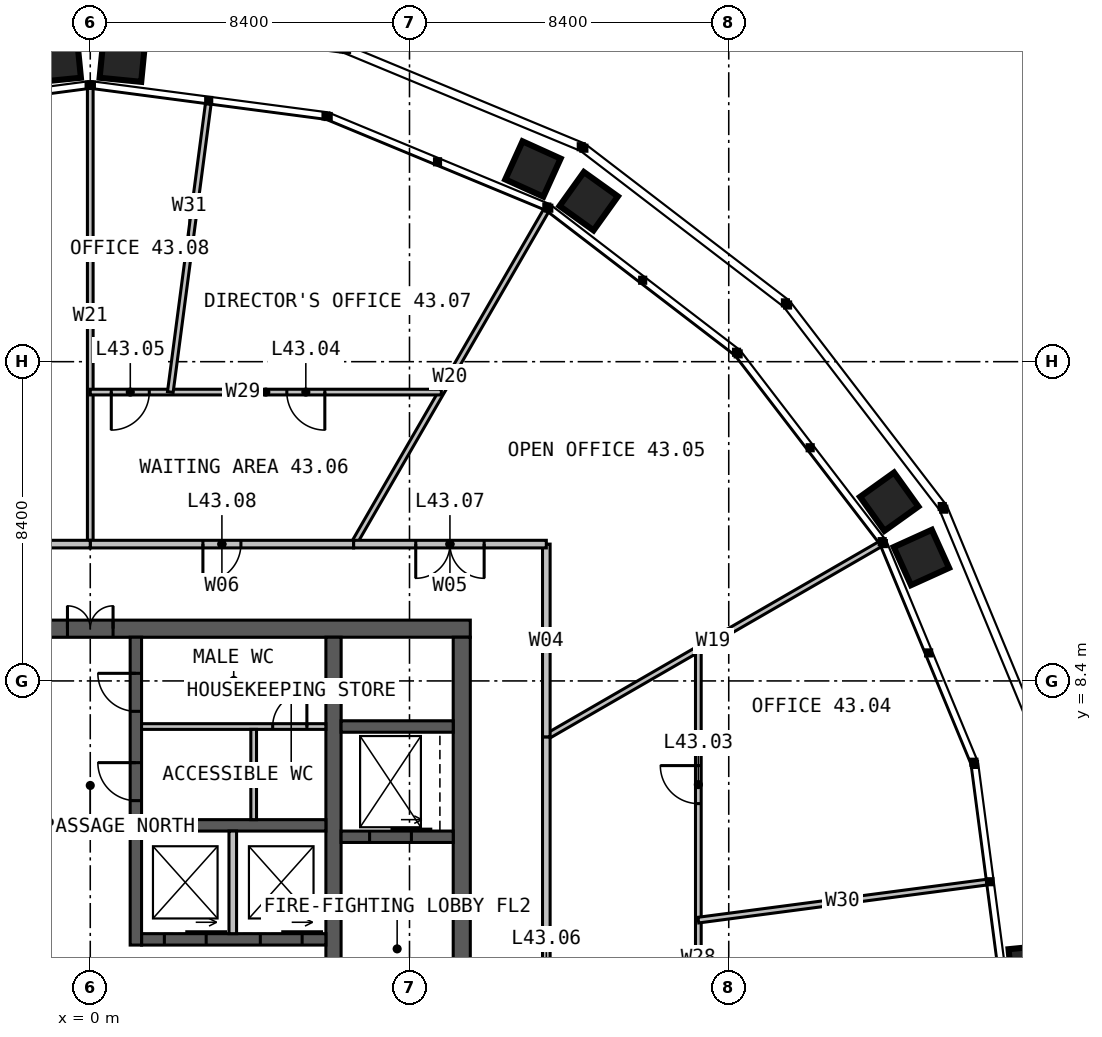
"""IFC4 building model, lengths in metres.
Left out: names, types, materials, properties, quantities, classifications, styles, units other than length and angle.
Written with IfcOpenShell. Run it as: python <this file> out.ifc"""

import sys

from ifc_helpers import new_model, si_unit, direction, frame, frame_2d, origin, place, context, subcontext, project, spatial, rectangle, extrude, element, fill, save


model = new_model("IFC4")
c1 = context("Model", 3, precision=1e-05, world=origin(), true_north=direction((0.0, 1.0)))
c2 = subcontext(c1, "Body", "Model", "MODEL_VIEW")
j1 = project(units=[si_unit("LENGTHUNIT", "METRE"), si_unit("PLANEANGLEUNIT", "RADIAN")], contexts=[c1])
p1 = place(None, origin())
s1 = spatial("IfcSite", under=j1, at=p1, CompositionType="ELEMENT")
p2 = place(p1, origin())
s2 = spatial("IfcBuilding", under=s1, at=p2, CompositionType="ELEMENT")
p3 = place(p2, frame((0.0, 0.0, 179.0)))
s3 = spatial("IfcBuildingStorey", under=s2, at=p3, CompositionType="ELEMENT", Elevation=179.0)
p4 = place(p3, frame((-10.0, 9.775, 0.0), z_axis=(0.0, 0.0, 1.0), x_axis=(1.0, 0.0, 0.0)))
e1 = element("IfcWall", 1, at=p4, inside=s3, PredefinedType="SOLIDWALL", context=c2, shape_type="SweptSolid", body=[
    extrude(rectangle(XDim=20.0, YDim=0.45, at=frame_2d((10.0, 0.0))), origin(), (0.0, 0.0, 1.0), 4.0),
])
p5 = place(p4, frame((9.4, 0.0, 0.0)))
e2 = element("IfcOpeningElement", 2, at=p5, cuts=e1, PredefinedType="OPENING", context=c2, shape_type="SweptSolid", body=[
    extrude(rectangle(XDim=1.2, YDim=2.2, at=frame_2d((0.6, 1.1))), frame((0.0, 0.235, 0.0), z_axis=(0.0, -1.0, 0.0), x_axis=(1.0, 0.0, 0.0)), (0.0, 0.0, 1.0), 0.47),
])
p6 = place(p3, frame((9.775, -9.55, 0.0), z_axis=(0.0, 0.0, 1.0), x_axis=(0.0, 1.0, 0.0)))
e3 = element("IfcWall", 3, at=p6, inside=s3, PredefinedType="SOLIDWALL", context=c2, shape_type="SweptSolid", body=[
    extrude(rectangle(XDim=19.1, YDim=0.45, at=frame_2d((9.55, 0.0))), origin(), (0.0, 0.0, 1.0), 4.0),
])
p7 = place(p3, frame((6.4, 9.55, 0.0), z_axis=(0.0, 0.0, 1.0), x_axis=(0.0, -1.0, 0.0)))
e4 = element("IfcWall", 4, at=p7, inside=s3, PredefinedType="SOLIDWALL", context=c2, shape_type="SweptSolid", body=[
    extrude(rectangle(XDim=19.1, YDim=0.4, at=frame_2d((9.55, 0.0))), origin(), (0.0, 0.0, 1.0), 4.0),
])
p8 = place(p7, frame((9.05, 0.0, 0.0)))
e5 = element("IfcOpeningElement", 5, at=p8, cuts=e4, PredefinedType="OPENING", context=c2, shape_type="SweptSolid", body=[
    extrude(rectangle(XDim=1.0, YDim=2.2, at=frame_2d((0.5, 1.1))), frame((0.0, 0.21, 0.0), z_axis=(0.0, -1.0, 0.0), x_axis=(1.0, 0.0, 0.0)), (0.0, 0.0, 1.0), 0.42),
])
p9 = place(p3, frame((1.35, 1.6, 0.0), z_axis=(0.0, 0.0, 1.0), x_axis=(1.0, 0.0, 0.0)))
e6 = element("IfcWall", 6, at=p9, inside=s3, PredefinedType="SOLIDWALL", context=c2, shape_type="SweptSolid", body=[
    extrude(rectangle(XDim=4.85, YDim=0.3, at=frame_2d((2.425, 0.0))), origin(), (0.0, 0.0, 1.0), 4.0),
])
p10 = place(p9, frame((0.6, 0.0, 0.0)))
e7 = element("IfcOpeningElement", 7, at=p10, cuts=e6, PredefinedType="OPENING", context=c2, shape_type="SweptSolid", body=[
    extrude(rectangle(XDim=1.1, YDim=2.2, at=frame_2d((0.55, 1.1))), frame((0.0, 0.16, 0.0), z_axis=(0.0, -1.0, 0.0), x_axis=(1.0, 0.0, 0.0)), (0.0, 0.0, 1.0), 0.32),
])
p11 = place(p9, frame((3.125, 0.0, 0.0)))
e8 = element("IfcOpeningElement", 8, at=p11, cuts=e6, PredefinedType="OPENING", context=c2, shape_type="SweptSolid", body=[
    extrude(rectangle(XDim=1.1, YDim=2.2, at=frame_2d((0.55, 1.1))), frame((0.0, 0.16, 0.0), z_axis=(0.0, -1.0, 0.0), x_axis=(1.0, 0.0, 0.0)), (0.0, 0.0, 1.0), 0.32),
])
p12 = place(p3, frame((1.35, 4.6, 0.0), z_axis=(0.0, 0.0, 1.0), x_axis=(1.0, 0.0, 0.0)))
e9 = element("IfcWall", 9, at=p12, inside=s3, PredefinedType="SOLIDWALL", context=c2, shape_type="SweptSolid", body=[
    extrude(rectangle(XDim=4.85, YDim=0.3, at=frame_2d((2.425, 0.0))), origin(), (0.0, 0.0, 1.0), 4.0),
])
p13 = place(p3, frame((1.2, 1.45, 0.0), z_axis=(0.0, 0.0, 1.0), x_axis=(0.0, 1.0, 0.0)))
e10 = element("IfcWall", 10, at=p13, inside=s3, PredefinedType="SOLIDWALL", context=c2, shape_type="SweptSolid", body=[
    extrude(rectangle(XDim=8.1, YDim=0.3, at=frame_2d((4.05, 0.0))), origin(), (0.0, 0.0, 1.0), 4.0),
])
p14 = place(p13, frame((3.8, 0.0, 0.0)))
e11 = element("IfcOpeningElement", 11, at=p14, cuts=e10, PredefinedType="OPENING", context=c2, shape_type="SweptSolid", body=[
    extrude(rectangle(XDim=1.0, YDim=2.2, at=frame_2d((0.5, 1.1))), frame((0.0, 0.16, 0.0), z_axis=(0.0, -1.0, 0.0), x_axis=(1.0, 0.0, 0.0)), (0.0, 0.0, 1.0), 0.32),
])
p15 = place(p13, frame((6.15, 0.0, 0.0)))
e12 = element("IfcOpeningElement", 12, at=p15, cuts=e10, PredefinedType="OPENING", context=c2, shape_type="SweptSolid", body=[
    extrude(rectangle(XDim=1.0, YDim=2.2, at=frame_2d((0.5, 1.1))), frame((0.0, 0.16, 0.0), z_axis=(0.0, -1.0, 0.0), x_axis=(1.0, 0.0, 0.0)), (0.0, 0.0, 1.0), 0.32),
])
p16 = place(p3, frame((6.6, 4.3, 0.0), z_axis=(0.0, 0.0, 1.0), x_axis=(1.0, 0.0, 0.0)))
e13 = element("IfcWall", 13, at=p16, inside=s3, PredefinedType="SOLIDWALL", context=c2, shape_type="SweptSolid", body=[
    extrude(rectangle(XDim=2.95, YDim=0.3, at=frame_2d((1.475, 0.0))), origin(), (0.0, 0.0, 1.0), 4.0),
])
p17 = place(p16, frame((0.75, 0.0, 0.0)))
e14 = element("IfcOpeningElement", 14, at=p17, cuts=e13, PredefinedType="OPENING", context=c2, shape_type="SweptSolid", body=[
    extrude(rectangle(XDim=1.1, YDim=2.2, at=frame_2d((0.55, 1.1))), frame((0.0, 0.16, 0.0), z_axis=(0.0, -1.0, 0.0), x_axis=(1.0, 0.0, 0.0)), (0.0, 0.0, 1.0), 0.32),
])
p18 = place(p3, frame((6.6, 7.2, 0.0), z_axis=(0.0, 0.0, 1.0), x_axis=(1.0, 0.0, 0.0)))
e15 = element("IfcWall", 15, at=p18, inside=s3, PredefinedType="SOLIDWALL", context=c2, shape_type="SweptSolid", body=[
    extrude(rectangle(XDim=2.95, YDim=0.3, at=frame_2d((1.475, 0.0))), origin(), (0.0, 0.0, 1.0), 4.0),
])
p19 = place(p3, frame((3.75, 1.75, 0.0), z_axis=(0.0, 0.0, 1.0), x_axis=(0.0, 1.0, 0.0)))
e16 = element("IfcWall", 16, at=p19, inside=s3, PredefinedType="SOLIDWALL", context=c2, shape_type="SweptSolid", body=[
    extrude(rectangle(XDim=2.7, YDim=0.2, at=frame_2d((1.35, 0.0))), origin(), (0.0, 0.0, 1.0), 3.75),
])
p20 = place(p3, frame((1.35, 7.2, 0.0), z_axis=(0.0, 0.0, 1.0), x_axis=(1.0, 0.0, 0.0)))
e17 = element("IfcWall", 17, at=p20, inside=s3, PredefinedType="PARTITIONING", context=c2, shape_type="SweptSolid", body=[
    extrude(rectangle(XDim=4.85, YDim=0.15, at=frame_2d((2.425, 0.0))), origin(), (0.0, 0.0, 1.0), 3.75),
])
p21 = place(p20, frame((3.45, 0.0, 0.0)))
e18 = element("IfcOpeningElement", 18, at=p21, cuts=e17, PredefinedType="OPENING", context=c2, shape_type="SweptSolid", body=[
    extrude(rectangle(XDim=0.9, YDim=2.2, at=frame_2d((0.45, 1.1))), frame((0.0, 0.085, 0.0), z_axis=(0.0, -1.0, 0.0), x_axis=(1.0, 0.0, 0.0)), (0.0, 0.0, 1.0), 0.17),
])
p22 = place(p3, frame((4.3, 4.75, 0.0), z_axis=(0.0, 0.0, 1.0), x_axis=(0.0, 1.0, 0.0)))
e19 = element("IfcWall", 19, at=p22, inside=s3, PredefinedType="PARTITIONING", context=c2, shape_type="SweptSolid", body=[
    extrude(rectangle(XDim=2.375, YDim=0.15, at=frame_2d((1.188, 0.0))), origin(), (0.0, 0.0, 1.0), 3.75),
])
for number, where, z_axis, x_axis in (
    (20, (12.0, 6.928, 0.0), (0.0, 0.0, 1.0), (0.866, 0.5, 0.0)),
    (21, (6.928, 12.0, 0.0), (0.0, 0.0, 1.0), (0.5, 0.866, 0.0)),
):
    element("IfcWall", number, at=place(p3, frame(where, z_axis=z_axis, x_axis=x_axis)), inside=s3, PredefinedType="PARTITIONING", context=c2, shape_type="SweptSolid", body=[
        extrude(rectangle(XDim=10.136, YDim=0.15, at=frame_2d((5.068, 0.0))), origin(), (0.0, 0.0, 1.0), 2.79),
    ])
p23 = place(p3, frame((0.0, 12.0, 0.0), z_axis=(0.0, 0.0, 1.0), x_axis=(0.0, 1.0, 0.0)))
e22 = element("IfcWall", 22, at=p23, inside=s3, PredefinedType="PARTITIONING", context=c2, shape_type="SweptSolid", body=[
    extrude(rectangle(XDim=11.992, YDim=0.15, at=frame_2d((5.996, 0.0))), origin(), (0.0, 0.0, 1.0), 2.79),
])
p24 = place(p3, frame((16.0, -9.238, 0.0), z_axis=(0.0, 0.0, 1.0), x_axis=(0.0, 1.0, 0.0)))
e23 = element("IfcWall", 23, at=p24, inside=s3, PredefinedType="PARTITIONING", context=c2, shape_type="SweptSolid", body=[
    extrude(rectangle(XDim=18.475, YDim=0.15, at=frame_2d((9.238, 0.0))), origin(), (0.0, 0.0, 1.0), 2.79),
])
p25 = place(p24, frame((1.975, 0.0, 0.0)))
e24 = element("IfcOpeningElement", 24, at=p25, cuts=e23, PredefinedType="OPENING", context=c2, shape_type="SweptSolid", body=[
    extrude(rectangle(XDim=1.0, YDim=2.2, at=frame_2d((0.5, 1.1))), frame((0.0, 0.085, 0.0), z_axis=(0.0, -1.0, 0.0), x_axis=(1.0, 0.0, 0.0)), (0.0, 0.0, 1.0), 0.17),
])
p26 = place(p24, frame((7.647, 0.0, 0.0)))
e25 = element("IfcOpeningElement", 25, at=p26, cuts=e23, PredefinedType="OPENING", context=c2, shape_type="SweptSolid", body=[
    extrude(rectangle(XDim=1.0, YDim=2.2, at=frame_2d((0.5, 1.1))), frame((0.0, 0.085, 0.0), z_axis=(0.0, -1.0, 0.0), x_axis=(1.0, 0.0, 0.0)), (0.0, 0.0, 1.0), 0.17),
])
p27 = place(p24, frame((14.41, 0.0, 0.0)))
e26 = element("IfcOpeningElement", 26, at=p27, cuts=e23, PredefinedType="OPENING", context=c2, shape_type="SweptSolid", body=[
    extrude(rectangle(XDim=1.0, YDim=2.2, at=frame_2d((0.5, 1.1))), frame((0.0, 0.085, 0.0), z_axis=(0.0, -1.0, 0.0), x_axis=(1.0, 0.0, 0.0)), (0.0, 0.0, 1.0), 0.17),
])
p28 = place(p3, frame((16.0, 2.106, 0.0), z_axis=(0.0, 0.0, 1.0), x_axis=(0.991446471711, 0.130513959913, 0.0)))
e27 = element("IfcWall", 27, at=p28, inside=s3, PredefinedType="PARTITIONING", context=c2, shape_type="SweptSolid", body=[
    extrude(rectangle(XDim=7.649, YDim=0.15, at=frame_2d((3.824, 0.0))), origin(), (0.0, 0.0, 1.0), 2.79),
])
p29 = place(p3, frame((12.0, -6.928, 0.0), z_axis=(0.0, 0.0, 1.0), x_axis=(0.0, 1.0, 0.0)))
e28 = element("IfcWall", 28, at=p29, inside=s3, PredefinedType="PARTITIONING", context=c2, shape_type="SweptSolid", body=[
    extrude(rectangle(XDim=13.856, YDim=0.2, at=frame_2d((6.928, 0.0))), origin(), (0.0, 0.0, 1.0), 3.8),
])
p30 = place(p29, frame((6.028, 0.0, 0.0)))
e29 = element("IfcOpeningElement", 29, at=p30, cuts=e28, PredefinedType="OPENING", context=c2, shape_type="SweptSolid", body=[
    extrude(rectangle(XDim=1.8, YDim=2.2, at=frame_2d((0.9, 1.1))), frame((0.0, 0.11, 0.0), z_axis=(0.0, -1.0, 0.0), x_axis=(1.0, 0.0, 0.0)), (0.0, 0.0, 1.0), 0.22),
])
p31 = place(p3, frame((12.0, 6.928, 0.0), z_axis=(0.0, 0.0, 1.0), x_axis=(0.0, 1.0, 0.0)))
e30 = element("IfcWall", 30, at=p31, inside=s3, PredefinedType="PARTITIONING", context=c2, shape_type="SweptSolid", body=[
    extrude(rectangle(XDim=5.072, YDim=0.2, at=frame_2d((2.536, 0.0))), origin(), (0.0, 0.0, 1.0), 3.8),
])
p32 = place(p3, frame((12.0, 12.0, 0.0), z_axis=(0.0, 0.0, 1.0), x_axis=(-1.0, 0.0, 0.0)))
e31 = element("IfcWall", 31, at=p32, inside=s3, PredefinedType="PARTITIONING", context=c2, shape_type="SweptSolid", body=[
    extrude(rectangle(XDim=5.072, YDim=0.2, at=frame_2d((2.536, 0.0))), origin(), (0.0, 0.0, 1.0), 3.8),
])
p33 = place(p32, frame((1.636, 0.0, 0.0)))
e32 = element("IfcOpeningElement", 32, at=p33, cuts=e31, PredefinedType="OPENING", context=c2, shape_type="SweptSolid", body=[
    extrude(rectangle(XDim=1.8, YDim=2.2, at=frame_2d((0.9, 1.1))), frame((0.0, 0.11, 0.0), z_axis=(0.0, -1.0, 0.0), x_axis=(1.0, 0.0, 0.0)), (0.0, 0.0, 1.0), 0.22),
])
p34 = place(p3, frame((9.238, 16.0, 0.0), z_axis=(0.0, 0.0, 1.0), x_axis=(-1.0, 0.0, 0.0)))
e33 = element("IfcWall", 33, at=p34, inside=s3, PredefinedType="PARTITIONING", context=c2, shape_type="SweptSolid", body=[
    extrude(rectangle(XDim=9.238, YDim=0.15, at=frame_2d((4.619, 0.0))), origin(), (0.0, 0.0, 1.0), 2.79),
])
p35 = place(p34, frame((3.066, 0.0, 0.0)))
e34 = element("IfcOpeningElement", 34, at=p35, cuts=e33, PredefinedType="OPENING", context=c2, shape_type="SweptSolid", body=[
    extrude(rectangle(XDim=1.0, YDim=2.2, at=frame_2d((0.5, 1.1))), frame((0.0, 0.085, 0.0), z_axis=(0.0, -1.0, 0.0), x_axis=(1.0, 0.0, 0.0)), (0.0, 0.0, 1.0), 0.17),
])
p36 = place(p34, frame((7.684, 0.0, 0.0)))
e35 = element("IfcOpeningElement", 35, at=p36, cuts=e33, PredefinedType="OPENING", context=c2, shape_type="SweptSolid", body=[
    extrude(rectangle(XDim=1.0, YDim=2.2, at=frame_2d((0.5, 1.1))), frame((0.0, 0.085, 0.0), z_axis=(0.0, -1.0, 0.0), x_axis=(1.0, 0.0, 0.0)), (0.0, 0.0, 1.0), 0.17),
])
p37 = place(p3, frame((2.106, 16.0, 0.0), z_axis=(0.0, 0.0, 1.0), x_axis=(0.130513959913, 0.991446471711, 0.0)))
e36 = element("IfcWall", 36, at=p37, inside=s3, PredefinedType="PARTITIONING", context=c2, shape_type="SweptSolid", body=[
    extrude(rectangle(XDim=7.649, YDim=0.15, at=frame_2d((3.824, 0.0))), origin(), (0.0, 0.0, 1.0), 2.79),
])
p38 = place(p3, frame((6.928, 12.0, 0.0), z_axis=(0.0, 0.0, 1.0), x_axis=(-1.0, 0.0, 0.0)))
e37 = element("IfcWall", 37, at=p38, inside=s3, PredefinedType="PARTITIONING", context=c2, shape_type="SweptSolid", body=[
    extrude(rectangle(XDim=6.928, YDim=0.2, at=frame_2d((3.464, 0.0))), origin(), (0.0, 0.0, 1.0), 3.8),
])
p39 = place(p38, frame((2.964, 0.0, 0.0)))
e38 = element("IfcOpeningElement", 38, at=p39, cuts=e37, PredefinedType="OPENING", context=c2, shape_type="SweptSolid", body=[
    extrude(rectangle(XDim=1.0, YDim=2.2, at=frame_2d((0.5, 1.1))), frame((0.0, 0.11, 0.0), z_axis=(0.0, -1.0, 0.0), x_axis=(1.0, 0.0, 0.0)), (0.0, 0.0, 1.0), 0.22),
])
p40 = place(p3, frame((0.0, 12.0, 0.0), z_axis=(0.0, 0.0, 1.0), x_axis=(-1.0, 0.0, 0.0)))
e39 = element("IfcWall", 39, at=p40, inside=s3, PredefinedType="PARTITIONING", context=c2, shape_type="SweptSolid", body=[
    extrude(rectangle(XDim=6.928, YDim=0.2, at=frame_2d((3.464, 0.0))), origin(), (0.0, 0.0, 1.0), 3.8),
])
p41 = place(p40, frame((2.964, 0.0, 0.0)))
e40 = element("IfcOpeningElement", 40, at=p41, cuts=e39, PredefinedType="OPENING", context=c2, shape_type="SweptSolid", body=[
    extrude(rectangle(XDim=1.0, YDim=2.2, at=frame_2d((0.5, 1.1))), frame((0.0, 0.11, 0.0), z_axis=(0.0, -1.0, 0.0), x_axis=(1.0, 0.0, 0.0)), (0.0, 0.0, 1.0), 0.22),
])
p42 = place(p5, origin())
e41 = element("IfcDoor", 41, at=p42, inside=s3, OperationType="DOUBLE_DOOR_SINGLE_SWING", PredefinedType="DOOR", context=c2, shape_type="SweptSolid", body=[
    extrude(rectangle(XDim=1.2, YDim=2.2, at=frame_2d((0.6, 1.1))), frame((0.0, 0.025, 0.0), z_axis=(0.0, -1.0, 0.0), x_axis=(1.0, 0.0, 0.0)), (0.0, 0.0, 1.0), 0.05),
])
fill(e2, e41)
p43 = place(p14, origin())
e42 = element("IfcDoor", 42, at=p43, inside=s3, OperationType="SINGLE_SWING_RIGHT", PredefinedType="DOOR", context=c2, shape_type="SweptSolid", body=[
    extrude(rectangle(XDim=1.0, YDim=2.2, at=frame_2d((0.5, 1.1))), frame((0.0, 0.025, 0.0), z_axis=(0.0, -1.0, 0.0), x_axis=(1.0, 0.0, 0.0)), (0.0, 0.0, 1.0), 0.05),
])
fill(e11, e42)
p44 = place(p15, origin())
e43 = element("IfcDoor", 43, at=p44, inside=s3, OperationType="SINGLE_SWING_RIGHT", PredefinedType="DOOR", context=c2, shape_type="SweptSolid", body=[
    extrude(rectangle(XDim=1.0, YDim=2.2, at=frame_2d((0.5, 1.1))), frame((0.0, 0.025, 0.0), z_axis=(0.0, -1.0, 0.0), x_axis=(1.0, 0.0, 0.0)), (0.0, 0.0, 1.0), 0.05),
])
fill(e12, e43)
p45 = place(p21, origin())
e44 = element("IfcDoor", 44, at=p45, inside=s3, OperationType="SINGLE_SWING_RIGHT", PredefinedType="DOOR", context=c2, shape_type="SweptSolid", body=[
    extrude(rectangle(XDim=0.9, YDim=2.2, at=frame_2d((0.45, 1.1))), frame((0.0, 0.025, 0.0), z_axis=(0.0, -1.0, 0.0), x_axis=(1.0, 0.0, 0.0)), (0.0, 0.0, 1.0), 0.05),
])
fill(e18, e44)
p46 = place(p10, origin())
e45 = element("IfcDoor", 45, at=p46, inside=s3, OperationType="SLIDING_TO_LEFT", PredefinedType="DOOR", context=c2, shape_type="SweptSolid", body=[
    extrude(rectangle(XDim=1.1, YDim=2.2, at=frame_2d((0.55, 1.1))), frame((0.0, 0.025, 0.0), z_axis=(0.0, -1.0, 0.0), x_axis=(1.0, 0.0, 0.0)), (0.0, 0.0, 1.0), 0.05),
])
fill(e7, e45)
p47 = place(p11, origin())
e46 = element("IfcDoor", 46, at=p47, inside=s3, OperationType="SLIDING_TO_LEFT", PredefinedType="DOOR", context=c2, shape_type="SweptSolid", body=[
    extrude(rectangle(XDim=1.1, YDim=2.2, at=frame_2d((0.55, 1.1))), frame((0.0, 0.025, 0.0), z_axis=(0.0, -1.0, 0.0), x_axis=(1.0, 0.0, 0.0)), (0.0, 0.0, 1.0), 0.05),
])
fill(e8, e46)
p48 = place(p17, origin())
e47 = element("IfcDoor", 47, at=p48, inside=s3, OperationType="SLIDING_TO_LEFT", PredefinedType="DOOR", context=c2, shape_type="SweptSolid", body=[
    extrude(rectangle(XDim=1.1, YDim=2.2, at=frame_2d((0.55, 1.1))), frame((0.0, 0.025, 0.0), z_axis=(0.0, -1.0, 0.0), x_axis=(1.0, 0.0, 0.0)), (0.0, 0.0, 1.0), 0.05),
])
fill(e14, e47)
p49 = place(p27, origin())
e48 = element("IfcDoor", 48, at=p49, inside=s3, OperationType="SINGLE_SWING_RIGHT", PredefinedType="DOOR", context=c2, shape_type="SweptSolid", body=[
    extrude(rectangle(XDim=1.0, YDim=2.2, at=frame_2d((0.5, 1.1))), frame((0.0, 0.025, 0.0), z_axis=(0.0, -1.0, 0.0), x_axis=(1.0, 0.0, 0.0)), (0.0, 0.0, 1.0), 0.05),
])
fill(e26, e48)
p50 = place(p33, origin())
e49 = element("IfcDoor", 49, at=p50, inside=s3, OperationType="DOUBLE_DOOR_SINGLE_SWING", PredefinedType="DOOR", context=c2, shape_type="SweptSolid", body=[
    extrude(rectangle(XDim=1.8, YDim=2.2, at=frame_2d((0.9, 1.1))), frame((0.0, 0.025, 0.0), z_axis=(0.0, -1.0, 0.0), x_axis=(1.0, 0.0, 0.0)), (0.0, 0.0, 1.0), 0.05),
])
fill(e32, e49)
p51 = place(p35, origin())
e50 = element("IfcDoor", 50, at=p51, inside=s3, OperationType="SINGLE_SWING_LEFT", PredefinedType="DOOR", context=c2, shape_type="SweptSolid", body=[
    extrude(rectangle(XDim=1.0, YDim=2.2, at=frame_2d((0.5, 1.1))), frame((0.0, 0.025, 0.0), z_axis=(0.0, -1.0, 0.0), x_axis=(1.0, 0.0, 0.0)), (0.0, 0.0, 1.0), 0.05),
])
fill(e34, e50)
p52 = place(p36, origin())
e51 = element("IfcDoor", 51, at=p52, inside=s3, OperationType="SINGLE_SWING_RIGHT", PredefinedType="DOOR", context=c2, shape_type="SweptSolid", body=[
    extrude(rectangle(XDim=1.0, YDim=2.2, at=frame_2d((0.5, 1.1))), frame((0.0, 0.025, 0.0), z_axis=(0.0, -1.0, 0.0), x_axis=(1.0, 0.0, 0.0)), (0.0, 0.0, 1.0), 0.05),
])
fill(e35, e51)
p53 = place(p39, origin())
e52 = element("IfcDoor", 52, at=p53, inside=s3, OperationType="SINGLE_SWING_RIGHT", PredefinedType="DOOR", context=c2, shape_type="SweptSolid", body=[
    extrude(rectangle(XDim=1.0, YDim=2.2, at=frame_2d((0.5, 1.1))), frame((0.0, 0.025, 0.0), z_axis=(0.0, -1.0, 0.0), x_axis=(1.0, 0.0, 0.0)), (0.0, 0.0, 1.0), 0.05),
])
fill(e38, e52)
save(model, sys.argv[1])
